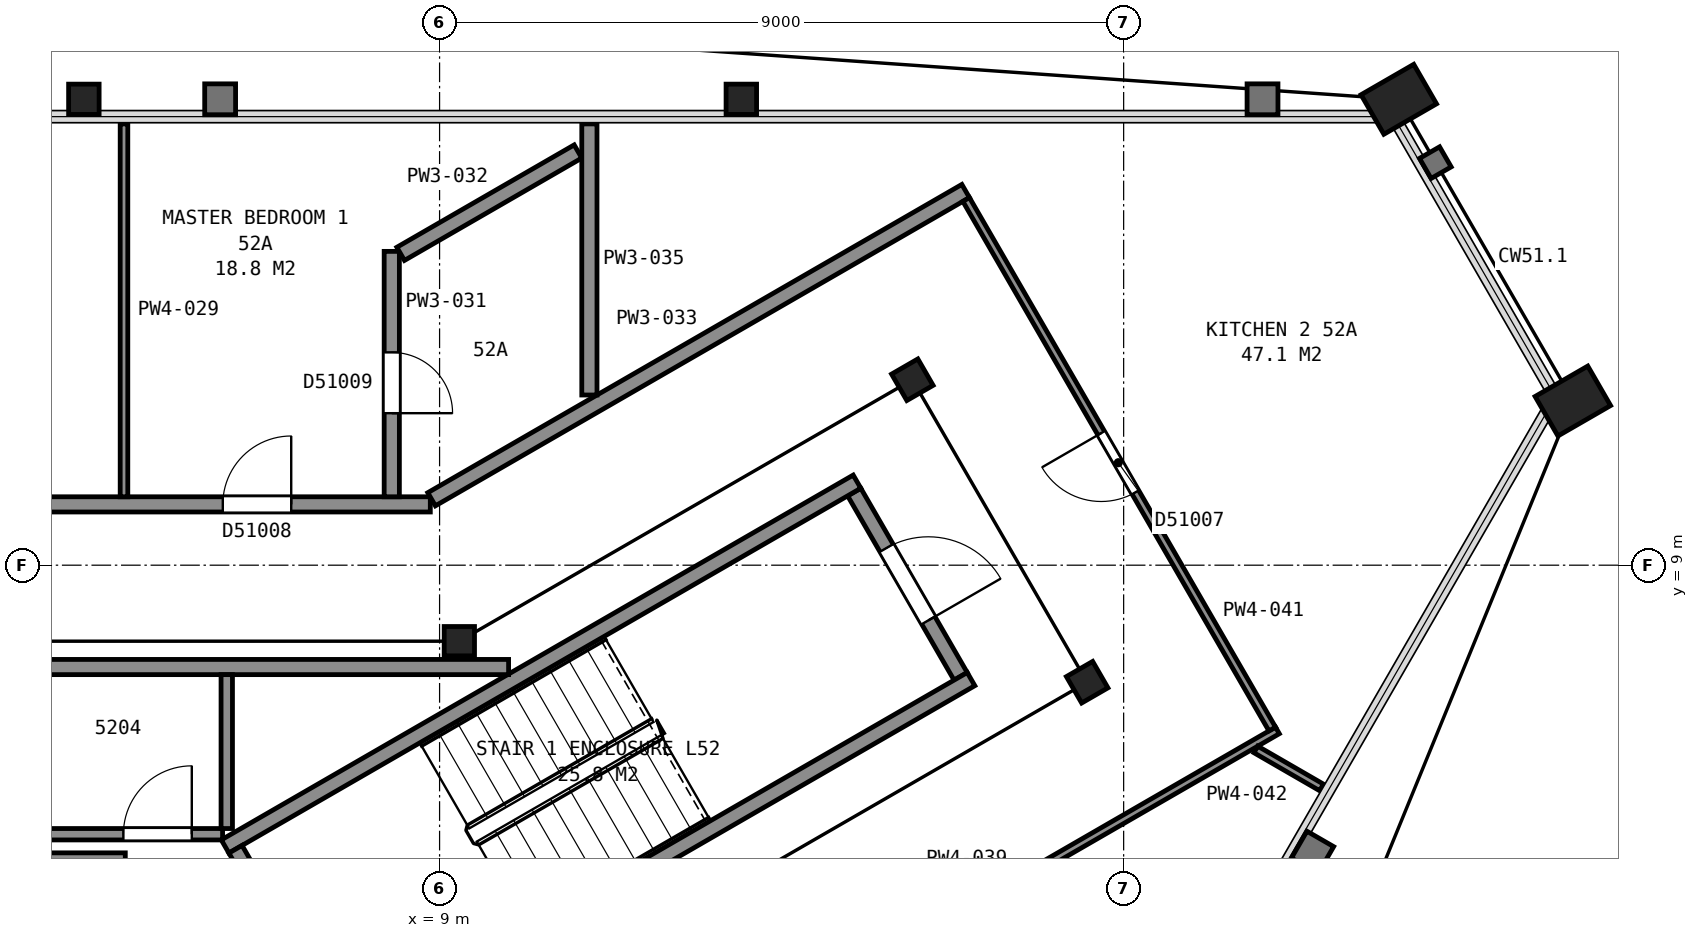
"""IFC4 building model, lengths in metres.
Left out: names, types, materials, properties, quantities, classifications, styles, units other than length and angle.
Written with IfcOpenShell. Run it as: python <this file> out.ifc"""

import sys

from ifc_helpers import new_model, si_unit, direction, frame, frame_2d, origin, origin_2d, place, context, subcontext, project, spatial, rectangle, hollow_rectangle, i_section, extrude, element, fill, save


model = new_model("IFC4")
c1 = context("Model", 3, precision=1e-05, world=origin(), true_north=direction((0.0, 1.0)))
c2 = subcontext(c1, "Body", "Model", "MODEL_VIEW")
j1 = project(units=[si_unit("LENGTHUNIT", "METRE"), si_unit("PLANEANGLEUNIT", "RADIAN")], contexts=[c1])
p1 = place(None, origin())
s1 = spatial("IfcSite", under=j1, at=p1, CompositionType="ELEMENT")
p2 = place(p1, origin())
s2 = spatial("IfcBuilding", under=s1, at=p2, CompositionType="ELEMENT")
p3 = place(p2, frame((0.0, 0.0, 210.1)))
s3 = spatial("IfcBuildingStorey", under=s2, at=p3, CompositionType="ELEMENT", Elevation=210.1)
p4 = place(p3, frame((21.62, 15.13, 0.0), z_axis=(0.0, 0.0, 1.0), x_axis=(0.5, -0.866025403784, 0.0)))
e1 = element("IfcColumn", 1, at=p4, inside=s3, PredefinedType="COLUMN", context=c2, shape_type="SweptSolid", body=[
    extrude(hollow_rectangle(XDim=0.6, YDim=0.8, WallThickness=0.05, at=origin_2d()), origin(), (0.0, 0.0, 1.0), 3.635),
])
p5 = place(p3, frame((12.97, 15.13, 0.0), z_axis=(0.0, 0.0, 1.0), x_axis=(1.0, 0.0, 0.0)))
e2 = element("IfcColumn", 2, at=p5, inside=s3, PredefinedType="COLUMN", context=c2, shape_type="SweptSolid", body=[
    extrude(i_section(OverallWidth=0.401, OverallDepth=0.399, WebThickness=0.025, FlangeThickness=0.04, FilletRadius=0.015, at=origin_2d()), origin(), (0.0, 0.0, 1.0), 3.66),
])
p6 = place(p3, frame((4.32, 15.13, 0.0), z_axis=(0.0, 0.0, 1.0), x_axis=(1.0, 0.0, 0.0)))
e3 = element("IfcColumn", 3, at=p6, inside=s3, PredefinedType="COLUMN", context=c2, shape_type="SweptSolid", body=[
    extrude(i_section(OverallWidth=0.401, OverallDepth=0.399, WebThickness=0.025, FlangeThickness=0.04, FilletRadius=0.015, at=origin_2d()), origin(), (0.0, 0.0, 1.0), 3.665),
])
p7 = place(p3, frame((23.91, 11.16, 0.0), z_axis=(0.0, 0.0, 1.0), x_axis=(0.5, -0.866025403784, 0.0)))
e4 = element("IfcColumn", 4, at=p7, inside=s3, PredefinedType="COLUMN", context=c2, shape_type="SweptSolid", body=[
    extrude(hollow_rectangle(XDim=0.6, YDim=0.8, WallThickness=0.05, at=origin_2d()), origin(), (0.0, 0.0, 1.0), 3.635),
])
for number, where, z_axis, x_axis in (
    (5, (17.52, 7.46, 0.0), (0.0, 0.0, 1.0), (0.5, -0.866, 0.0)),
    (6, (15.22, 11.44, 0.0), (0.0, 0.0, 1.0), (0.5, -0.866, 0.0)),
):
    element("IfcColumn", number, at=place(p3, frame(where, z_axis=z_axis, x_axis=x_axis)), inside=s3, PredefinedType="COLUMN", context=c2, shape_type="SweptSolid", body=[
        extrude(i_section(OverallWidth=0.401, OverallDepth=0.399, WebThickness=0.025, FlangeThickness=0.04, FilletRadius=0.015, at=origin_2d()), origin(), (0.0, 0.0, 1.0), 3.7),
    ])
p8 = place(p3, frame((9.26, 8.0, 0.0), z_axis=(0.0, 0.0, 1.0), x_axis=(1.0, 0.0, 0.0)))
e7 = element("IfcColumn", 7, at=p8, inside=s3, PredefinedType="COLUMN", context=c2, shape_type="SweptSolid", body=[
    extrude(i_section(OverallWidth=0.399, OverallDepth=0.386, WebThickness=0.021, FlangeThickness=0.033, FilletRadius=0.015, at=origin_2d()), origin(), (0.0, 0.0, 1.0), 3.7),
])
p9 = place(p3, frame((15.855, 7.538, 0.0), z_axis=(0.0, 0.0, 1.0), x_axis=(-0.500049511043, 0.865996816683, 0.0)))
e8 = element("IfcWall", 8, at=p9, inside=s3, PredefinedType="PARTITIONING", context=c2, shape_type="SweptSolid", body=[
    extrude(rectangle(XDim=2.8, YDim=0.2, at=frame_2d((1.4, 0.0))), origin(), (0.0, 0.0, 1.0), 3.45),
])
p10 = place(p9, frame((0.85, 0.0, 0.0)))
e9 = element("IfcOpeningElement", 9, at=p10, cuts=e8, PredefinedType="OPENING", context=c2, shape_type="SweptSolid", body=[
    extrude(rectangle(XDim=1.1, YDim=2.1, at=frame_2d((0.55, 1.05))), frame((0.0, 0.11, 0.0), z_axis=(0.0, -1.0, 0.0), x_axis=(1.0, 0.0, 0.0)), (0.0, 0.0, 1.0), 0.22),
])
for number, where, z_axis, x_axis in (
    (10, (6.178, 5.299, 0.0), (0.0, 0.0, 1.0), (0.866, 0.5, 0.0)),
    (11, (7.678, 2.701, 0.0), (0.0, 0.0, 1.0), (0.866, 0.5, 0.0)),
):
    element("IfcWall", number, at=place(p3, frame(where, z_axis=z_axis, x_axis=x_axis)), inside=s3, PredefinedType="PARTITIONING", context=c2, shape_type="SweptSolid", body=[
        extrude(rectangle(XDim=9.6, YDim=0.2, at=frame_2d((4.8, 0.0))), origin(), (0.0, 0.0, 1.0), 3.45),
    ])
p11 = place(p3, frame((7.715, 2.838, 0.0), z_axis=(0.0, 0.0, 1.0), x_axis=(-0.500049511043, 0.865996816683, 0.0)))
e12 = element("IfcWall", 12, at=p11, inside=s3, PredefinedType="PARTITIONING", context=c2, shape_type="SweptSolid", body=[
    extrude(rectangle(XDim=2.8, YDim=0.2, at=frame_2d((1.4, 0.0))), origin(), (0.0, 0.0, 1.0), 3.45),
])
p12 = place(p3, frame((-3.933, 7.66, 0.0), z_axis=(0.0, 0.0, 1.0), x_axis=(1.0, 0.0, 0.0)))
e13 = element("IfcWall", 13, at=p12, inside=s3, PredefinedType="PARTITIONING", context=c2, shape_type="SweptSolid", body=[
    extrude(rectangle(XDim=13.841, YDim=0.2, at=frame_2d((6.92, 0.0))), origin(), (0.0, 0.0, 1.0), 3.45),
])
p13 = place(p3, frame((-0.245, 5.14, 0.0), z_axis=(0.0, 0.0, 1.0), x_axis=(1.0, 0.0, 0.0)))
e14 = element("IfcWall", 14, at=p13, inside=s3, PredefinedType="PARTITIONING", context=c2, shape_type="SweptSolid", body=[
    extrude(rectangle(XDim=5.11, YDim=0.15, at=frame_2d((2.555, 0.0))), origin(), (0.0, 0.0, 1.0), 3.45),
])
p14 = place(p13, frame((0.175, 0.0, 0.0)))
e15 = element("IfcOpeningElement", 15, at=p14, cuts=e14, PredefinedType="OPENING", context=c2, shape_type="SweptSolid", body=[
    extrude(rectangle(XDim=1.0, YDim=2.1, at=frame_2d((0.5, 1.05))), frame((0.0, 0.085, 0.0), z_axis=(0.0, -1.0, 0.0), x_axis=(1.0, 0.0, 0.0)), (0.0, 0.0, 1.0), 0.17),
])
p15 = place(p3, frame((0.925, 5.46, 0.0), z_axis=(0.0, 0.0, 1.0), x_axis=(1.0, 0.0, 0.0)))
e16 = element("IfcWall", 16, at=p15, inside=s3, PredefinedType="PARTITIONING", context=c2, shape_type="SweptSolid", body=[
    extrude(rectangle(XDim=5.22, YDim=0.15, at=frame_2d((2.61, 0.0))), origin(), (0.0, 0.0, 1.0), 3.45),
])
p16 = place(p15, frame((3.915, 0.0, 0.0)))
e17 = element("IfcOpeningElement", 17, at=p16, cuts=e16, PredefinedType="OPENING", context=c2, shape_type="SweptSolid", body=[
    extrude(rectangle(XDim=0.9, YDim=2.1, at=frame_2d((0.45, 1.05))), frame((0.0, 0.085, 0.0), z_axis=(0.0, -1.0, 0.0), x_axis=(1.0, 0.0, 0.0)), (0.0, 0.0, 1.0), 0.17),
])
p17 = place(p3, frame((6.2, 5.535, 0.0), z_axis=(0.0, 0.0, 1.0), x_axis=(0.0, 1.0, 0.0)))
e18 = element("IfcWall", 18, at=p17, inside=s3, PredefinedType="PARTITIONING", context=c2, shape_type="SweptSolid", body=[
    extrude(rectangle(XDim=2.025, YDim=0.15, at=frame_2d((1.013, 0.0))), origin(), (0.0, 0.0, 1.0), 3.45),
])
p18 = place(p3, frame((-8.828, 9.8, 0.0), z_axis=(0.0, 0.0, 1.0), x_axis=(1.0, 0.0, 0.0)))
e19 = element("IfcWall", 19, at=p18, inside=s3, PredefinedType="PARTITIONING", context=c2, shape_type="SweptSolid", body=[
    extrude(rectangle(XDim=17.706, YDim=0.2, at=frame_2d((8.853, 0.0))), origin(), (0.0, 0.0, 1.0), 2.713),
])
p19 = place(p18, frame((14.976, 0.0, 0.0)))
e20 = element("IfcOpeningElement", 20, at=p19, cuts=e19, PredefinedType="OPENING", context=c2, shape_type="SweptSolid", body=[
    extrude(rectangle(XDim=0.9, YDim=2.1, at=frame_2d((0.45, 1.05))), frame((0.0, 0.11, 0.0), z_axis=(0.0, -1.0, 0.0), x_axis=(1.0, 0.0, 0.0)), (0.0, 0.0, 1.0), 0.22),
])
p20 = place(p18, frame((10.673, 0.0, 0.0)))
e21 = element("IfcOpeningElement", 21, at=p20, cuts=e19, PredefinedType="OPENING", context=c2, shape_type="SweptSolid", body=[
    extrude(rectangle(XDim=0.9, YDim=2.1, at=frame_2d((0.45, 1.05))), frame((0.0, 0.11, 0.0), z_axis=(0.0, -1.0, 0.0), x_axis=(1.0, 0.0, 0.0)), (0.0, 0.0, 1.0), 0.22),
])
p21 = place(p18, frame((5.57, 0.0, 0.0)))
e22 = element("IfcOpeningElement", 22, at=p21, cuts=e19, PredefinedType="OPENING", context=c2, shape_type="SweptSolid", body=[
    extrude(rectangle(XDim=0.9, YDim=2.1, at=frame_2d((0.45, 1.05))), frame((0.0, 0.11, 0.0), z_axis=(0.0, -1.0, 0.0), x_axis=(1.0, 0.0, 0.0)), (0.0, 0.0, 1.0), 0.22),
])
p22 = place(p18, frame((1.3, 0.0, 0.0)))
e23 = element("IfcOpeningElement", 23, at=p22, cuts=e19, PredefinedType="OPENING", context=c2, shape_type="SweptSolid", body=[
    extrude(rectangle(XDim=0.9, YDim=2.1, at=frame_2d((0.45, 1.05))), frame((0.0, 0.11, 0.0), z_axis=(0.0, -1.0, 0.0), x_axis=(1.0, 0.0, 0.0)), (0.0, 0.0, 1.0), 0.22),
])
p23 = place(p3, frame((4.848, 9.9, 0.0), z_axis=(0.0, 0.0, 1.0), x_axis=(0.0, 1.0, 0.0)))
e24 = element("IfcWall", 24, at=p23, inside=s3, PredefinedType="PARTITIONING", context=c2, shape_type="SweptSolid", body=[
    extrude(rectangle(XDim=4.906, YDim=0.1, at=frame_2d((2.453, 0.0))), origin(), (0.0, 0.0, 1.0), 2.713),
])
p24 = place(p3, frame((8.371, 13.129, 0.0), z_axis=(0.0, 0.0, 1.0), x_axis=(0.0, -1.0, 0.0)))
e25 = element("IfcWall", 25, at=p24, inside=s3, PredefinedType="PARTITIONING", context=c2, shape_type="SweptSolid", body=[
    extrude(rectangle(XDim=3.229, YDim=0.2, at=frame_2d((1.615, 0.0))), origin(), (0.0, 0.0, 1.0), 2.713),
])
p25 = place(p24, frame((1.329, 0.0, 0.0)))
e26 = element("IfcOpeningElement", 26, at=p25, cuts=e25, PredefinedType="OPENING", context=c2, shape_type="SweptSolid", body=[
    extrude(rectangle(XDim=0.8, YDim=2.1, at=frame_2d((0.4, 1.05))), frame((0.0, 0.11, 0.0), z_axis=(0.0, -1.0, 0.0), x_axis=(1.0, 0.0, 0.0)), (0.0, 0.0, 1.0), 0.22),
])
p26 = place(p3, frame((8.488, 13.096, 0.0), z_axis=(0.0, 0.0, 1.0), x_axis=(0.866031650062, 0.499989180974, 0.0)))
e27 = element("IfcWall", 27, at=p26, inside=s3, PredefinedType="PARTITIONING", context=c2, shape_type="SweptSolid", body=[
    extrude(rectangle(XDim=2.694, YDim=0.2, at=frame_2d((1.347, 0.0))), origin(), (0.0, 0.0, 1.0), 2.713),
])
p27 = place(p3, frame((8.895, 9.867, 0.0), z_axis=(0.0, 0.0, 1.0), x_axis=(0.866079355551, 0.499906541154, 0.0)))
e28 = element("IfcWall", 28, at=p27, inside=s3, PredefinedType="PARTITIONING", context=c2, shape_type="SweptSolid", body=[
    extrude(rectangle(XDim=8.113, YDim=0.2, at=frame_2d((4.056, 0.0))), origin(), (0.0, 0.0, 1.0), 2.713),
])
p28 = place(p3, frame((10.971, 11.239, 0.0), z_axis=(0.0, 0.0, 1.0), x_axis=(0.0, 1.0, 0.0)))
e29 = element("IfcWall", 29, at=p28, inside=s3, PredefinedType="PARTITIONING", context=c2, shape_type="SweptSolid", body=[
    extrude(rectangle(XDim=3.567, YDim=0.2, at=frame_2d((1.783, 0.0))), origin(), (0.0, 0.0, 1.0), 2.713),
])
p29 = place(p3, frame((12.952, 2.744, 0.0), z_axis=(0.0, 0.0, 1.0), x_axis=(0.86608949446, 0.499888975259, 0.0)))
e30 = element("IfcWall", 30, at=p29, inside=s3, PredefinedType="PARTITIONING", context=c2, shape_type="SweptSolid", body=[
    extrude(rectangle(XDim=8.165, YDim=0.1, at=frame_2d((4.083, 0.0))), origin(), (0.0, 0.0, 1.0), 2.713),
])
p30 = place(p3, frame((15.928, 13.812, 0.0), z_axis=(0.0, 0.0, 1.0), x_axis=(0.500422653123, -0.865781247337, 0.0)))
e31 = element("IfcWall", 31, at=p30, inside=s3, PredefinedType="PARTITIONING", context=c2, shape_type="SweptSolid", body=[
    extrude(rectangle(XDim=8.047, YDim=0.1, at=frame_2d((4.024, 0.0))), origin(), (0.0, 0.0, 1.0), 2.713),
])
p31 = place(p30, frame((3.55, 0.0, 0.0)))
e32 = element("IfcOpeningElement", 32, at=p31, cuts=e31, PredefinedType="OPENING", context=c2, shape_type="SweptSolid", body=[
    extrude(rectangle(XDim=0.9, YDim=2.1, at=frame_2d((0.45, 1.05))), frame((0.0, 0.06, 0.0), z_axis=(0.0, -1.0, 0.0), x_axis=(1.0, 0.0, 0.0)), (0.0, 0.0, 1.0), 0.12),
])
p32 = place(p3, frame((19.739, 6.576, 0.0), z_axis=(0.0, 0.0, 1.0), x_axis=(0.865855657918, -0.500293893279, 0.0)))
e33 = element("IfcWall", 33, at=p32, inside=s3, PredefinedType="PARTITIONING", context=c2, shape_type="SweptSolid", body=[
    extrude(rectangle(XDim=0.999, YDim=0.1, at=frame_2d((0.499, 0.0))), origin(), (0.0, 0.0, 1.0), 2.713),
])
p33 = place(p10, origin())
e34 = element("IfcDoor", 34, at=p33, inside=s3, OperationType="SINGLE_SWING_LEFT", PredefinedType="DOOR", context=c2, shape_type="SweptSolid", body=[
    extrude(rectangle(XDim=1.1, YDim=2.1, at=frame_2d((0.55, 1.05))), frame((0.0, 0.025, 0.0), z_axis=(0.0, -1.0, 0.0), x_axis=(1.0, 0.0, 0.0)), (0.0, 0.0, 1.0), 0.05),
])
fill(e9, e34)
p34 = place(p16, origin())
e35 = element("IfcDoor", 35, at=p34, inside=s3, OperationType="SINGLE_SWING_RIGHT", PredefinedType="DOOR", context=c2, shape_type="SweptSolid", body=[
    extrude(rectangle(XDim=0.9, YDim=2.1, at=frame_2d((0.45, 1.05))), frame((0.0, 0.025, 0.0), z_axis=(0.0, -1.0, 0.0), x_axis=(1.0, 0.0, 0.0)), (0.0, 0.0, 1.0), 0.05),
])
fill(e17, e35)
p35 = place(p19, origin())
e36 = element("IfcDoor", 36, at=p35, inside=s3, OperationType="SINGLE_SWING_RIGHT", PredefinedType="DOOR", context=c2, shape_type="SweptSolid", body=[
    extrude(rectangle(XDim=0.9, YDim=2.1, at=frame_2d((0.45, 1.05))), frame((0.0, 0.025, 0.0), z_axis=(0.0, -1.0, 0.0), x_axis=(1.0, 0.0, 0.0)), (0.0, 0.0, 1.0), 0.05),
])
fill(e20, e36)
p36 = place(p25, origin())
e37 = element("IfcDoor", 37, at=p36, inside=s3, OperationType="SINGLE_SWING_RIGHT", PredefinedType="DOOR", context=c2, shape_type="SweptSolid", body=[
    extrude(rectangle(XDim=0.8, YDim=2.1, at=frame_2d((0.4, 1.05))), frame((0.0, 0.025, 0.0), z_axis=(0.0, -1.0, 0.0), x_axis=(1.0, 0.0, 0.0)), (0.0, 0.0, 1.0), 0.05),
])
fill(e26, e37)
p37 = place(p31, origin())
e38 = element("IfcDoor", 38, at=p37, inside=s3, OperationType="SINGLE_SWING_LEFT", PredefinedType="DOOR", context=c2, shape_type="SweptSolid", body=[
    extrude(rectangle(XDim=0.9, YDim=2.1, at=frame_2d((0.45, 1.05))), frame((0.0, 0.025, 0.0), z_axis=(0.0, -1.0, 0.0), x_axis=(1.0, 0.0, 0.0)), (0.0, 0.0, 1.0), 0.05),
])
fill(e32, e38)
save(model, sys.argv[1])
